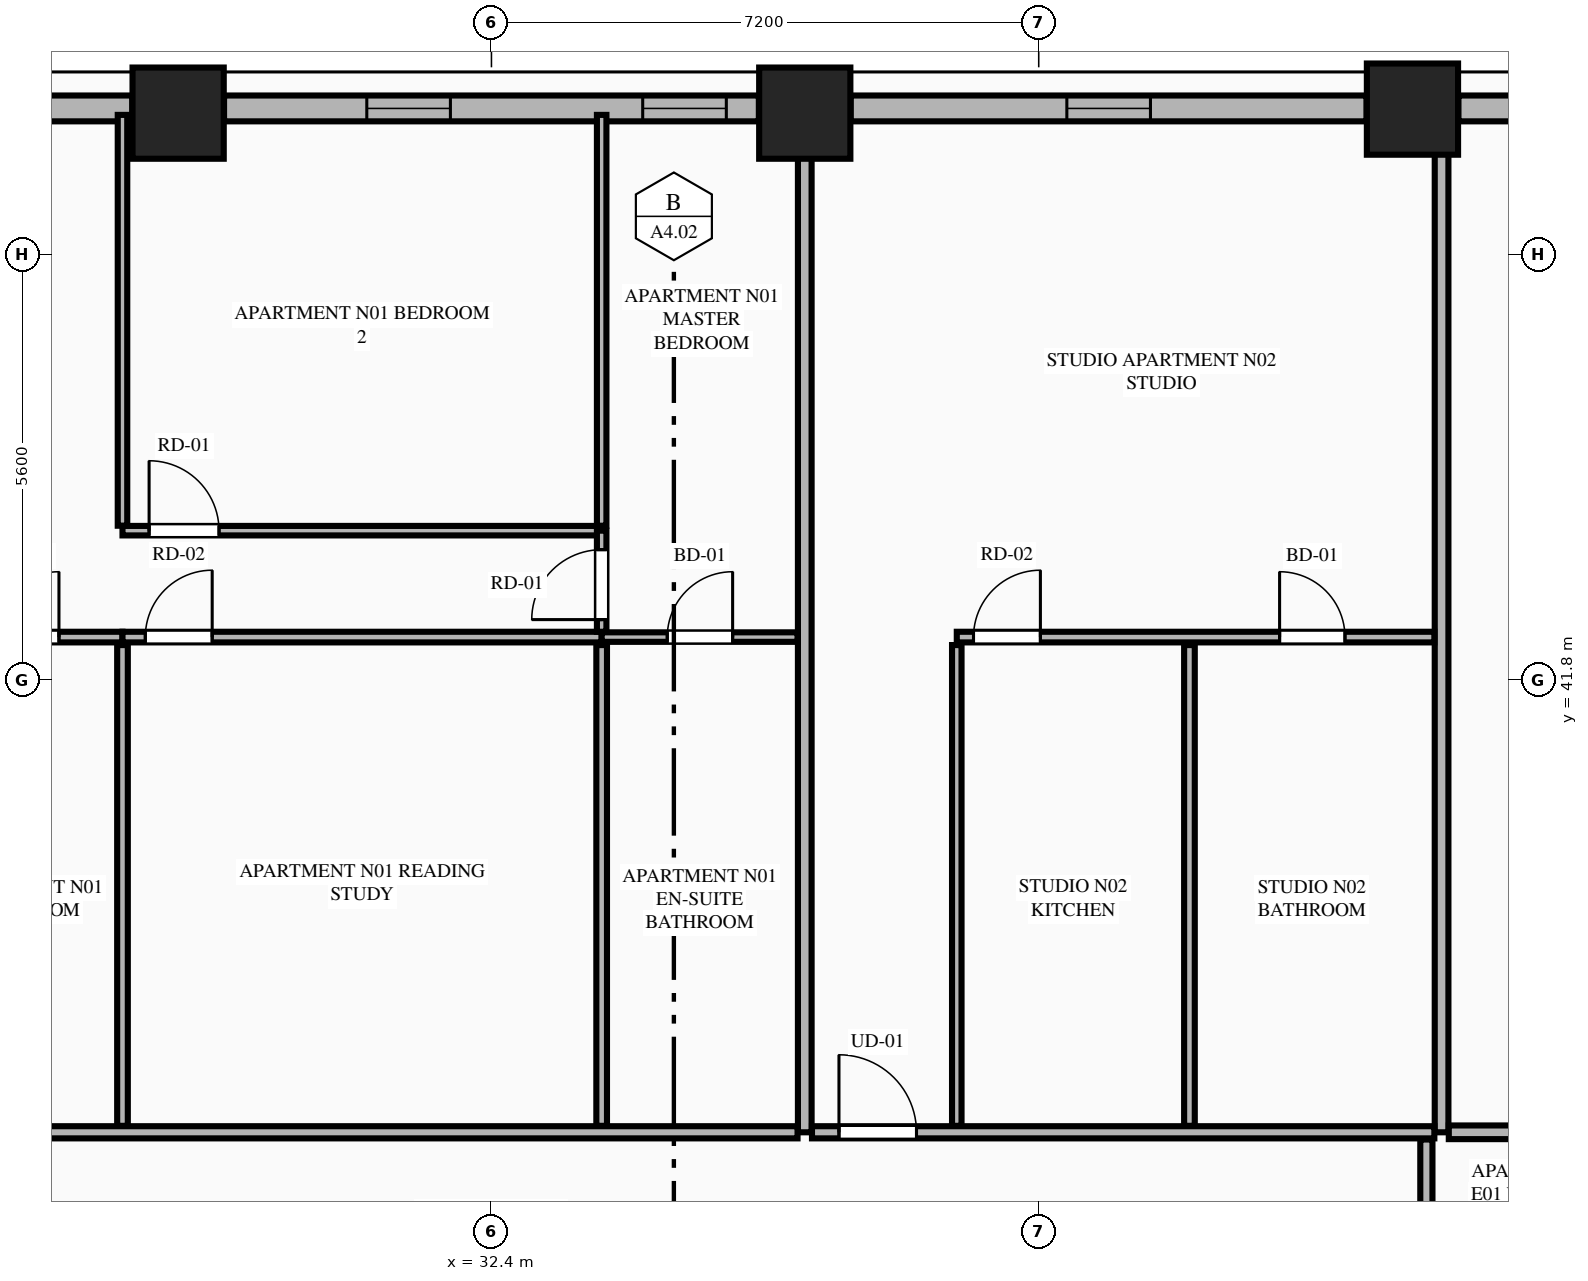
"""IFC4 building model, lengths in metres.
Left out: names, types, materials, properties, quantities, classifications, styles, units other than length and angle.
Written with IfcOpenShell. Run it as: python <this file> out.ifc"""

import sys

from ifc_helpers import new_model, si_unit, direction, frame, frame_2d, origin, origin_2d, place, context, subcontext, project, spatial, rectangle, extrude, element, fill, save


model = new_model("IFC4")
c1 = context("Model", 3, precision=1e-05, world=origin(), true_north=direction((0.0, 1.0)))
c2 = subcontext(c1, "Body", "Model", "MODEL_VIEW")
j1 = project(units=[si_unit("LENGTHUNIT", "METRE"), si_unit("PLANEANGLEUNIT", "RADIAN")], contexts=[c1])
p1 = place(None, origin())
s1 = spatial("IfcSite", under=j1, at=p1, CompositionType="ELEMENT")
p2 = place(p1, origin())
s2 = spatial("IfcBuilding", under=s1, at=p2, CompositionType="ELEMENT")
p3 = place(p2, frame((0.0, 0.0, 56.85)))
s3 = spatial("IfcBuildingStorey", under=s2, at=p3, CompositionType="ELEMENT", Elevation=56.85)
for number, where, z_axis, x_axis in (
    (1, (44.517, 49.311, 0.0), (0.0, 0.0, 1.0), (1.0, 0.0, 0.0)),
    (2, (36.522, 49.258, 0.0), (0.0, 0.0, 1.0), (1.0, 0.0, 0.0)),
    (3, (28.278, 49.258, 0.0), (0.0, 0.0, 1.0), (1.0, 0.0, 0.0)),
):
    element("IfcColumn", number, at=place(p3, frame(where, z_axis=z_axis, x_axis=x_axis)), inside=s3, PredefinedType="COLUMN", context=c2, shape_type="SweptSolid", body=[
        extrude(rectangle(XDim=1.2, YDim=1.2, at=origin_2d()), origin(), (0.0, 0.0, 1.0), 3.55),
    ])
p4 = place(p3, frame((46.366, 49.32, 0.0), z_axis=(0.0, 0.0, 1.0), x_axis=(-1.0, 0.0, 0.0)))
e4 = element("IfcWall", 4, at=p4, inside=s3, PredefinedType="STANDARD", context=c2, shape_type="SweptSolid", body=[
    extrude(rectangle(XDim=1.245, YDim=0.34, at=frame_2d((0.623, 0.0))), origin(), (0.0, 0.0, 1.0), 3.33),
])
p5 = place(p3, frame((43.913, 49.32, 0.0), z_axis=(0.0, 0.0, 1.0), x_axis=(-1.0, 0.0, 0.0)))
e5 = element("IfcWall", 5, at=p5, inside=s3, PredefinedType="STANDARD", context=c2, shape_type="SweptSolid", body=[
    extrude(rectangle(XDim=6.787, YDim=0.34, at=frame_2d((3.394, 0.0))), origin(), (0.0, 0.0, 1.0), 2.787),
])
p6 = place(p5, frame((2.843, 0.0, 0.75)))
e6 = element("IfcOpeningElement", 6, at=p6, cuts=e5, PredefinedType="OPENING", context=c2, shape_type="SweptSolid", body=[
    extrude(rectangle(XDim=1.1, YDim=1.887, at=frame_2d((0.55, 0.943))), frame((0.0, 0.18, 0.0), z_axis=(0.0, -1.0, 0.0), x_axis=(1.0, 0.0, 0.0)), (0.0, 0.0, 1.0), 0.36),
])
p7 = place(p3, frame((35.918, 49.32, 0.0), z_axis=(0.0, 0.0, 1.0), x_axis=(-1.0, 0.0, 0.0)))
e7 = element("IfcWall", 7, at=p7, inside=s3, PredefinedType="STANDARD", context=c2, shape_type="SweptSolid", body=[
    extrude(rectangle(XDim=7.036, YDim=0.34, at=frame_2d((3.518, 0.0))), origin(), (0.0, 0.0, 1.0), 2.787),
])
p8 = place(p7, frame((0.428, 0.0, 0.75)))
e8 = element("IfcOpeningElement", 8, at=p8, cuts=e7, PredefinedType="OPENING", context=c2, shape_type="SweptSolid", body=[
    extrude(rectangle(XDim=1.1, YDim=1.887, at=frame_2d((0.55, 0.943))), frame((0.0, 0.18, 0.0), z_axis=(0.0, -1.0, 0.0), x_axis=(1.0, 0.0, 0.0)), (0.0, 0.0, 1.0), 0.36),
])
p9 = place(p7, frame((4.058, 0.0, 0.75)))
e9 = element("IfcOpeningElement", 9, at=p9, cuts=e7, PredefinedType="OPENING", context=c2, shape_type="SweptSolid", body=[
    extrude(rectangle(XDim=1.1, YDim=1.887, at=frame_2d((0.55, 0.943))), frame((0.0, 0.18, 0.0), z_axis=(0.0, -1.0, 0.0), x_axis=(1.0, 0.0, 0.0)), (0.0, 0.0, 1.0), 0.36),
])
p10 = place(p3, frame((27.674, 49.32, 0.0), z_axis=(0.0, 0.0, 1.0), x_axis=(-1.0, 0.0, 0.0)))
e10 = element("IfcWall", 10, at=p10, inside=s3, PredefinedType="STANDARD", context=c2, shape_type="SweptSolid", body=[
    extrude(rectangle(XDim=6.787, YDim=0.34, at=frame_2d((3.394, 0.0))), origin(), (0.0, 0.0, 1.0), 2.787),
])
p11 = place(p10, frame((2.843, 0.0, 0.75)))
e11 = element("IfcOpeningElement", 11, at=p11, cuts=e10, PredefinedType="OPENING", context=c2, shape_type="SweptSolid", body=[
    extrude(rectangle(XDim=1.1, YDim=1.887, at=frame_2d((0.55, 0.943))), frame((0.0, 0.18, 0.0), z_axis=(0.0, -1.0, 0.0), x_axis=(1.0, 0.0, 0.0)), (0.0, 0.0, 1.0), 0.36),
])
p12 = place(p3, frame((36.522, 35.85, 0.0), z_axis=(0.0, 0.0, 1.0), x_axis=(0.0, 1.0, 0.0)))
e12 = element("IfcWall", 12, at=p12, inside=s3, PredefinedType="PARTITIONING", context=c2, shape_type="SweptSolid", body=[
    extrude(rectangle(XDim=13.295, YDim=0.18, at=frame_2d((6.647, 0.0))), origin(), (0.0, 0.0, 1.0), 2.7),
])
p13 = place(p3, frame((44.9, 35.85, 0.0), z_axis=(0.0, 0.0, 1.0), x_axis=(0.0, 1.0, 0.0)))
e13 = element("IfcWall", 13, at=p13, inside=s3, PredefinedType="PARTITIONING", context=c2, shape_type="SweptSolid", body=[
    extrude(rectangle(XDim=13.295, YDim=0.18, at=frame_2d((6.647, 0.0))), origin(), (0.0, 0.0, 1.0), 3.33),
])
p14 = place(p3, frame((19.995, 35.85, 0.0), z_axis=(0.0, 0.0, 1.0), x_axis=(1.0, 0.0, 0.0)))
e14 = element("IfcWall", 14, at=p14, inside=s3, PredefinedType="PARTITIONING", context=c2, shape_type="SweptSolid", body=[
    extrude(rectangle(XDim=16.432, YDim=0.16, at=frame_2d((8.216, 0.0))), origin(), (0.0, 0.0, 1.0), 3.33),
])
p15 = place(p14, frame((0.705, 0.0, 0.0)))
e15 = element("IfcOpeningElement", 15, at=p15, cuts=e14, PredefinedType="OPENING", context=c2, shape_type="SweptSolid", body=[
    extrude(rectangle(XDim=1.35, YDim=2.35, at=frame_2d((0.675, 1.175))), frame((0.0, 0.09, 0.0), z_axis=(0.0, -1.0, 0.0), x_axis=(1.0, 0.0, 0.0)), (0.0, 0.0, 1.0), 0.18),
])
p16 = place(p3, frame((22.25, 42.365, 0.0), z_axis=(0.0, 0.0, 1.0), x_axis=(1.0, 0.0, 0.0)))
e16 = element("IfcWall", 16, at=p16, inside=s3, PredefinedType="PLUMBINGWALL", context=c2, shape_type="SweptSolid", body=[
    extrude(rectangle(XDim=5.296, YDim=0.14, at=frame_2d((2.648, 0.0))), origin(), (0.0, 0.0, 1.0), 3.33),
])
p17 = place(p16, frame((3.6, 0.0, 0.0)))
e17 = element("IfcOpeningElement", 17, at=p17, cuts=e16, PredefinedType="OPENING", context=c2, shape_type="SweptSolid", body=[
    extrude(rectangle(XDim=0.86, YDim=2.1, at=frame_2d((0.43, 1.05))), frame((0.0, 0.08, 0.0), z_axis=(0.0, -1.0, 0.0), x_axis=(1.0, 0.0, 0.0)), (0.0, 0.0, 1.0), 0.16),
])
p18 = place(p16, frame((0.26, 0.0, 0.0)))
e18 = element("IfcOpeningElement", 18, at=p18, cuts=e16, PredefinedType="OPENING", context=c2, shape_type="SweptSolid", body=[
    extrude(rectangle(XDim=0.88, YDim=2.15, at=frame_2d((0.44, 1.075))), frame((0.0, 0.08, 0.0), z_axis=(0.0, -1.0, 0.0), x_axis=(1.0, 0.0, 0.0)), (0.0, 0.0, 1.0), 0.16),
])
p19 = place(p3, frame((27.546, 42.365, 0.0), z_axis=(0.0, 0.0, 1.0), x_axis=(1.0, 0.0, 0.0)))
e19 = element("IfcWall", 19, at=p19, inside=s3, PredefinedType="PLUMBINGWALL", context=c2, shape_type="SweptSolid", body=[
    extrude(rectangle(XDim=6.304, YDim=0.14, at=frame_2d((3.152, 0.0))), origin(), (0.0, 0.0, 1.0), 3.33),
])
p20 = place(p19, frame((0.3, 0.0, 0.0)))
e20 = element("IfcOpeningElement", 20, at=p20, cuts=e19, PredefinedType="OPENING", context=c2, shape_type="SweptSolid", body=[
    extrude(rectangle(XDim=0.88, YDim=2.15, at=frame_2d((0.44, 1.075))), frame((0.0, 0.08, 0.0), z_axis=(0.0, -1.0, 0.0), x_axis=(1.0, 0.0, 0.0)), (0.0, 0.0, 1.0), 0.16),
])
p21 = place(p3, frame((33.85, 42.365, 0.0), z_axis=(0.0, 0.0, 1.0), x_axis=(1.0, 0.0, 0.0)))
e21 = element("IfcWall", 21, at=p21, inside=s3, PredefinedType="PARTITIONING", context=c2, shape_type="SweptSolid", body=[
    extrude(rectangle(XDim=2.577, YDim=0.125, at=frame_2d((1.289, 0.0))), origin(), (0.0, 0.0, 1.0), 3.33),
])
p22 = place(p21, frame((0.863, 0.0, 0.0)))
e22 = element("IfcOpeningElement", 22, at=p22, cuts=e21, PredefinedType="OPENING", context=c2, shape_type="SweptSolid", body=[
    extrude(rectangle(XDim=0.86, YDim=2.1, at=frame_2d((0.43, 1.05))), frame((0.0, 0.073, 0.0), z_axis=(0.0, -1.0, 0.0), x_axis=(1.0, 0.0, 0.0)), (0.0, 0.0, 1.0), 0.145),
])
p23 = place(p3, frame((27.546, 43.83, 0.0), z_axis=(0.0, 0.0, 1.0), x_axis=(0.0, 1.0, 0.0)))
e23 = element("IfcWall", 23, at=p23, inside=s3, PredefinedType="PARTITIONING", context=c2, shape_type="SweptSolid", body=[
    extrude(rectangle(XDim=5.405, YDim=0.125, at=frame_2d((2.703, 0.0))), origin(), (0.0, 0.0, 1.0), 3.33),
])
p24 = place(p3, frame((27.546, 43.765, 0.0), z_axis=(0.0, 0.0, 1.0), x_axis=(1.0, 0.0, 0.0)))
e24 = element("IfcWall", 24, at=p24, inside=s3, PredefinedType="PARTITIONING", context=c2, shape_type="SweptSolid", body=[
    extrude(rectangle(XDim=6.304, YDim=0.125, at=frame_2d((3.152, 0.0))), origin(), (0.0, 0.0, 1.0), 3.33),
])
p25 = place(p24, frame((0.35, 0.0, 0.0)))
e25 = element("IfcOpeningElement", 25, at=p25, cuts=e24, PredefinedType="OPENING", context=c2, shape_type="SweptSolid", body=[
    extrude(rectangle(XDim=0.92, YDim=2.15, at=frame_2d((0.46, 1.075))), frame((0.0, 0.073, 0.0), z_axis=(0.0, -1.0, 0.0), x_axis=(1.0, 0.0, 0.0)), (0.0, 0.0, 1.0), 0.145),
])
p26 = place(p3, frame((33.85, 42.435, 0.0), z_axis=(0.0, 0.0, 1.0), x_axis=(0.0, 1.0, 0.0)))
e26 = element("IfcWall", 26, at=p26, inside=s3, PredefinedType="PARTITIONING", context=c2, shape_type="SweptSolid", body=[
    extrude(rectangle(XDim=1.33, YDim=0.125, at=frame_2d((0.665, 0.0))), origin(), (0.0, 0.0, 1.0), 3.33),
])
p27 = place(p26, frame((0.16, 0.0, 0.0)))
e27 = element("IfcOpeningElement", 27, at=p27, cuts=e26, PredefinedType="OPENING", context=c2, shape_type="SweptSolid", body=[
    extrude(rectangle(XDim=0.92, YDim=2.15, at=frame_2d((0.46, 1.075))), frame((0.0, 0.073, 0.0), z_axis=(0.0, -1.0, 0.0), x_axis=(1.0, 0.0, 0.0)), (0.0, 0.0, 1.0), 0.145),
])
for number, where, z_axis, x_axis in (
    (28, (27.546, 35.935, 0.0), (0.0, 0.0, 1.0), (0.0, 1.0, 0.0)),
    (29, (33.85, 35.935, 0.0), (0.0, 0.0, 1.0), (0.0, 1.0, 0.0)),
):
    element("IfcWall", number, at=place(p3, frame(where, z_axis=z_axis, x_axis=x_axis)), inside=s3, PredefinedType="PLUMBINGWALL", context=c2, shape_type="SweptSolid", body=[
        extrude(rectangle(XDim=6.325, YDim=0.14, at=frame_2d((3.163, 0.0))), origin(), (0.0, 0.0, 1.0), 3.33),
    ])
p28 = place(p3, frame((33.85, 43.83, 0.0), z_axis=(0.0, 0.0, 1.0), x_axis=(0.0, 1.0, 0.0)))
e30 = element("IfcWall", 30, at=p28, inside=s3, PredefinedType="PARTITIONING", context=c2, shape_type="SweptSolid", body=[
    extrude(rectangle(XDim=5.405, YDim=0.125, at=frame_2d((2.703, 0.0))), origin(), (0.0, 0.0, 1.0), 3.33),
])
p29 = place(p3, frame((36.617, 35.85, 0.0), z_axis=(0.0, 0.0, 1.0), x_axis=(1.0, 0.0, 0.0)))
e31 = element("IfcWall", 31, at=p29, inside=s3, PredefinedType="PARTITIONING", context=c2, shape_type="SweptSolid", body=[
    extrude(rectangle(XDim=8.188, YDim=0.16, at=frame_2d((4.094, 0.0))), origin(), (0.0, 0.0, 1.0), 3.33),
])
p30 = place(p29, frame((0.355, 0.0, 0.0)))
e32 = element("IfcOpeningElement", 32, at=p30, cuts=e31, PredefinedType="OPENING", context=c2, shape_type="SweptSolid", body=[
    extrude(rectangle(XDim=1.02, YDim=2.25, at=frame_2d((0.51, 1.125))), frame((0.0, 0.09, 0.0), z_axis=(0.0, -1.0, 0.0), x_axis=(1.0, 0.0, 0.0)), (0.0, 0.0, 1.0), 0.18),
])
p31 = place(p3, frame((38.522, 35.935, 0.0), z_axis=(0.0, 0.0, 1.0), x_axis=(0.0, 1.0, 0.0)))
e33 = element("IfcWall", 33, at=p31, inside=s3, PredefinedType="PARTITIONING", context=c2, shape_type="SweptSolid", body=[
    extrude(rectangle(XDim=6.325, YDim=0.125, at=frame_2d((3.163, 0.0))), origin(), (0.0, 0.0, 1.0), 3.33),
])
p32 = place(p3, frame((38.522, 42.365, 0.0), z_axis=(0.0, 0.0, 1.0), x_axis=(1.0, 0.0, 0.0)))
e34 = element("IfcWall", 34, at=p32, inside=s3, PredefinedType="PLUMBINGWALL", context=c2, shape_type="SweptSolid", body=[
    extrude(rectangle(XDim=6.283, YDim=0.14, at=frame_2d((3.142, 0.0))), origin(), (0.0, 0.0, 1.0), 3.33),
])
p33 = place(p32, frame((4.247, 0.0, 0.0)))
e35 = element("IfcOpeningElement", 35, at=p33, cuts=e34, PredefinedType="OPENING", context=c2, shape_type="SweptSolid", body=[
    extrude(rectangle(XDim=0.86, YDim=2.1, at=frame_2d((0.43, 1.05))), frame((0.0, 0.08, 0.0), z_axis=(0.0, -1.0, 0.0), x_axis=(1.0, 0.0, 0.0)), (0.0, 0.0, 1.0), 0.16),
])
p34 = place(p32, frame((0.22, 0.0, 0.0)))
e36 = element("IfcOpeningElement", 36, at=p34, cuts=e34, PredefinedType="OPENING", context=c2, shape_type="SweptSolid", body=[
    extrude(rectangle(XDim=0.88, YDim=2.15, at=frame_2d((0.44, 1.075))), frame((0.0, 0.08, 0.0), z_axis=(0.0, -1.0, 0.0), x_axis=(1.0, 0.0, 0.0)), (0.0, 0.0, 1.0), 0.16),
])
p35 = place(p3, frame((41.583, 35.935, 0.0), z_axis=(0.0, 0.0, 1.0), x_axis=(0.0, 1.0, 0.0)))
e37 = element("IfcWall", 37, at=p35, inside=s3, PredefinedType="PLUMBINGWALL", context=c2, shape_type="SweptSolid", body=[
    extrude(rectangle(XDim=6.325, YDim=0.14, at=frame_2d((3.163, 0.0))), origin(), (0.0, 0.0, 1.0), 3.33),
])
p36 = place(p3, frame((44.995, 35.85, 0.0), z_axis=(0.0, 0.0, 1.0), x_axis=(1.0, 0.0, 0.0)))
e38 = element("IfcWall", 38, at=p36, inside=s3, PredefinedType="PARTITIONING", context=c2, shape_type="SweptSolid", body=[
    extrude(rectangle(XDim=9.14, YDim=0.18, at=frame_2d((4.57, 0.0))), origin(), (0.0, 0.0, 1.0), 3.33),
])
p37 = place(p3, frame((44.7, 16.045, 0.0), z_axis=(0.0, 0.0, 1.0), x_axis=(0.0, 1.0, 0.0)))
e39 = element("IfcWall", 39, at=p37, inside=s3, PredefinedType="PARTITIONING", context=c2, shape_type="SweptSolid", body=[
    extrude(rectangle(XDim=19.71, YDim=0.16, at=frame_2d((9.855, 0.0))), origin(), (0.0, 0.0, 1.0), 2.7),
])
p38 = place(p37, frame((0.45, 0.0, 0.0)))
e40 = element("IfcOpeningElement", 40, at=p38, cuts=e39, PredefinedType="OPENING", context=c2, shape_type="SweptSolid", body=[
    extrude(rectangle(XDim=1.02, YDim=2.25, at=frame_2d((0.51, 1.125))), frame((0.0, 0.09, 0.0), z_axis=(0.0, -1.0, 0.0), x_axis=(1.0, 0.0, 0.0)), (0.0, 0.0, 1.0), 0.18),
])
p39 = place(p6, origin())
e41 = element("IfcWindow", 41, at=p39, inside=s3, PartitioningType="SINGLE_PANEL", PredefinedType="WINDOW", context=c2, shape_type="SweptSolid", body=[
    extrude(rectangle(XDim=1.1, YDim=1.887, at=frame_2d((0.55, 0.943))), frame((0.0, 0.03, 0.0), z_axis=(0.0, -1.0, 0.0), x_axis=(1.0, 0.0, 0.0)), (0.0, 0.0, 1.0), 0.06),
])
fill(e6, e41)
p40 = place(p8, origin())
e42 = element("IfcWindow", 42, at=p40, inside=s3, PartitioningType="SINGLE_PANEL", PredefinedType="WINDOW", context=c2, shape_type="SweptSolid", body=[
    extrude(rectangle(XDim=1.1, YDim=1.887, at=frame_2d((0.55, 0.943))), frame((0.0, 0.03, 0.0), z_axis=(0.0, -1.0, 0.0), x_axis=(1.0, 0.0, 0.0)), (0.0, 0.0, 1.0), 0.06),
])
fill(e8, e42)
p41 = place(p17, origin())
e43 = element("IfcDoor", 43, at=p41, inside=s3, OperationType="SINGLE_SWING_RIGHT", PredefinedType="DOOR", context=c2, shape_type="SweptSolid", body=[
    extrude(rectangle(XDim=0.86, YDim=2.1, at=frame_2d((0.43, 1.05))), frame((0.0, 0.025, 0.0), z_axis=(0.0, -1.0, 0.0), x_axis=(1.0, 0.0, 0.0)), (0.0, 0.0, 1.0), 0.05),
])
fill(e17, e43)
p42 = place(p22, origin())
e44 = element("IfcDoor", 44, at=p42, inside=s3, OperationType="SINGLE_SWING_RIGHT", PredefinedType="DOOR", context=c2, shape_type="SweptSolid", body=[
    extrude(rectangle(XDim=0.86, YDim=2.1, at=frame_2d((0.43, 1.05))), frame((0.0, 0.025, 0.0), z_axis=(0.0, -1.0, 0.0), x_axis=(1.0, 0.0, 0.0)), (0.0, 0.0, 1.0), 0.05),
])
fill(e22, e44)
p43 = place(p20, origin())
e45 = element("IfcDoor", 45, at=p43, inside=s3, OperationType="SINGLE_SWING_RIGHT", PredefinedType="DOOR", context=c2, shape_type="SweptSolid", body=[
    extrude(rectangle(XDim=0.88, YDim=2.15, at=frame_2d((0.44, 1.075))), frame((0.0, 0.025, 0.0), z_axis=(0.0, -1.0, 0.0), x_axis=(1.0, 0.0, 0.0)), (0.0, 0.0, 1.0), 0.05),
])
fill(e20, e45)
p44 = place(p25, origin())
e46 = element("IfcDoor", 46, at=p44, inside=s3, OperationType="SINGLE_SWING_LEFT", PredefinedType="DOOR", context=c2, shape_type="SweptSolid", body=[
    extrude(rectangle(XDim=0.92, YDim=2.15, at=frame_2d((0.46, 1.075))), frame((0.0, 0.025, 0.0), z_axis=(0.0, -1.0, 0.0), x_axis=(1.0, 0.0, 0.0)), (0.0, 0.0, 1.0), 0.05),
])
fill(e25, e46)
p45 = place(p27, origin())
e47 = element("IfcDoor", 47, at=p45, inside=s3, OperationType="SINGLE_SWING_LEFT", PredefinedType="DOOR", context=c2, shape_type="SweptSolid", body=[
    extrude(rectangle(XDim=0.92, YDim=2.15, at=frame_2d((0.46, 1.075))), frame((0.0, 0.025, 0.0), z_axis=(0.0, -1.0, 0.0), x_axis=(1.0, 0.0, 0.0)), (0.0, 0.0, 1.0), 0.05),
])
fill(e27, e47)
p46 = place(p33, origin())
e48 = element("IfcDoor", 48, at=p46, inside=s3, OperationType="SINGLE_SWING_LEFT", PredefinedType="DOOR", context=c2, shape_type="SweptSolid", body=[
    extrude(rectangle(XDim=0.86, YDim=2.1, at=frame_2d((0.43, 1.05))), frame((0.0, 0.025, 0.0), z_axis=(0.0, -1.0, 0.0), x_axis=(1.0, 0.0, 0.0)), (0.0, 0.0, 1.0), 0.05),
])
fill(e35, e48)
p47 = place(p30, origin())
e49 = element("IfcDoor", 49, at=p47, inside=s3, OperationType="SINGLE_SWING_LEFT", PredefinedType="DOOR", context=c2, shape_type="SweptSolid", body=[
    extrude(rectangle(XDim=1.02, YDim=2.25, at=frame_2d((0.51, 1.125))), frame((0.0, 0.025, 0.0), z_axis=(0.0, -1.0, 0.0), x_axis=(1.0, 0.0, 0.0)), (0.0, 0.0, 1.0), 0.05),
])
fill(e32, e49)
p48 = place(p34, origin())
e50 = element("IfcDoor", 50, at=p48, inside=s3, OperationType="SINGLE_SWING_RIGHT", PredefinedType="DOOR", context=c2, shape_type="SweptSolid", body=[
    extrude(rectangle(XDim=0.88, YDim=2.15, at=frame_2d((0.44, 1.075))), frame((0.0, 0.025, 0.0), z_axis=(0.0, -1.0, 0.0), x_axis=(1.0, 0.0, 0.0)), (0.0, 0.0, 1.0), 0.05),
])
fill(e36, e50)
p49 = place(p9, origin())
e51 = element("IfcWindow", 51, at=p49, inside=s3, PartitioningType="SINGLE_PANEL", PredefinedType="WINDOW", context=c2, shape_type="SweptSolid", body=[
    extrude(rectangle(XDim=1.1, YDim=1.887, at=frame_2d((0.55, 0.943))), frame((0.0, 0.03, 0.0), z_axis=(0.0, -1.0, 0.0), x_axis=(1.0, 0.0, 0.0)), (0.0, 0.0, 1.0), 0.06),
])
fill(e9, e51)
save(model, sys.argv[1])
